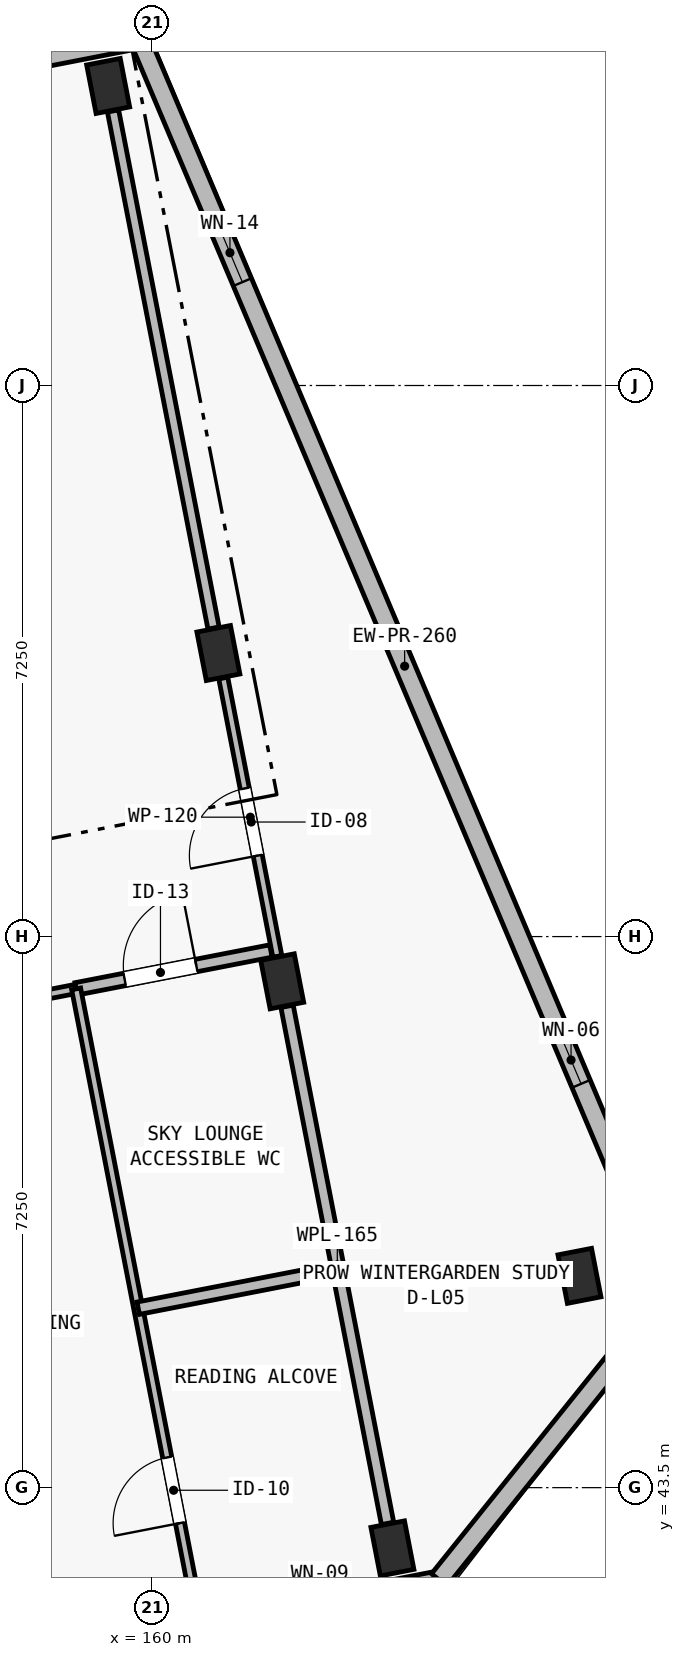
"""IFC4 building model, lengths in metres.
Left out: names, types, materials, properties, quantities, classifications, styles, units other than length and angle.
Written with IfcOpenShell. Run it as: python <this file> out.ifc"""

import sys

from ifc_helpers import new_model, si_unit, direction, frame, frame_2d, origin, origin_2d, place, context, subcontext, project, spatial, rectangle, extrude, element, fill, save


model = new_model("IFC4")
c1 = context("Model", 3, precision=1e-05, world=origin(), true_north=direction((0.0, 1.0)))
c2 = subcontext(c1, "Body", "Model", "MODEL_VIEW")
j1 = project(units=[si_unit("LENGTHUNIT", "METRE"), si_unit("PLANEANGLEUNIT", "RADIAN")], contexts=[c1])
p1 = place(None, origin())
s1 = spatial("IfcSite", under=j1, at=p1, CompositionType="ELEMENT")
p2 = place(p1, origin())
s2 = spatial("IfcBuilding", under=s1, at=p2, CompositionType="ELEMENT")
p3 = place(p2, frame((0.0, 0.0, 18.15)))
s3 = spatial("IfcBuildingStorey", under=s2, at=p3, CompositionType="ELEMENT", Elevation=18.15)
for number, where, z_axis, x_axis in (
    (1, (163.162, 42.701, 0.0), (0.0, 0.0, 1.0), (0.982, 0.191, 0.0)),
    (2, (161.712, 50.161, 0.0), (0.0, 0.0, 1.0), (0.982, 0.191, 0.0)),
    (3, (160.873, 54.48, 0.0), (0.0, 0.0, 1.0), (0.982, 0.191, 0.0)),
    (4, (159.422, 61.941, 0.0), (0.0, 0.0, 1.0), (0.982, 0.191, 0.0)),
    (5, (165.623, 46.286, 0.0), (0.0, 0.0, 1.0), (0.982, 0.191, 0.0)),
):
    element("IfcColumn", number, at=place(p3, frame(where, z_axis=z_axis, x_axis=x_axis)), inside=s3, PredefinedType="COLUMN", context=c2, shape_type="SweptSolid", body=[
        extrude(rectangle(XDim=0.45, YDim=0.65, at=origin_2d()), origin(), (0.0, 0.0, 1.0), 3.25),
    ])
p4 = place(p3, frame((163.778, 42.286, 0.0), z_axis=(0.0, 0.0, 1.0), x_axis=(-0.981628367112, -0.190802905848, 0.0)))
e6 = element("IfcWall", 6, at=p4, inside=s3, PredefinedType="SOLIDWALL", context=c2, shape_type="SweptSolid", body=[
    extrude(rectangle(XDim=8.125, YDim=0.24, at=frame_2d((4.062, 0.0))), origin(), (0.0, 0.0, 1.0), 3.0),
])
p5 = place(p4, frame((1.23, 0.0, 0.48)))
e7 = element("IfcOpeningElement", 7, at=p5, cuts=e6, PredefinedType="OPENING", context=c2, shape_type="SweptSolid", body=[
    extrude(rectangle(XDim=0.74, YDim=2.26, at=frame_2d((0.37, 1.13))), frame((0.0, 0.135, 0.0), z_axis=(0.0, -1.0, 0.0), x_axis=(1.0, 0.0, 0.0)), (0.0, 0.0, 1.0), 0.27),
])
p6 = place(p4, frame((5.035, 0.0, 0.48)))
e8 = element("IfcOpeningElement", 8, at=p6, cuts=e6, PredefinedType="OPENING", context=c2, shape_type="SweptSolid", body=[
    extrude(rectangle(XDim=0.8, YDim=2.3, at=frame_2d((0.4, 1.15))), frame((0.0, 0.135, 0.0), z_axis=(0.0, -1.0, 0.0), x_axis=(1.0, 0.0, 0.0)), (0.0, 0.0, 1.0), 0.27),
])
p7 = place(p3, frame((151.862, 61.006, 0.0), z_axis=(0.0, 0.0, 1.0), x_axis=(0.981627273155, 0.190808533872, 0.0)))
e9 = element("IfcWall", 9, at=p7, inside=s3, PredefinedType="SOLIDWALL", context=c2, shape_type="SweptSolid", body=[
    extrude(rectangle(XDim=8.125, YDim=0.24, at=frame_2d((4.062, 0.0))), origin(), (0.0, 0.0, 1.0), 3.0),
])
p8 = place(p3, frame((159.837, 62.556, 0.0), z_axis=(0.0, 0.0, 1.0), x_axis=(0.389225507936, -0.921142499276, 0.0)))
e10 = element("IfcWall", 10, at=p8, inside=s3, PredefinedType="SOLIDWALL", context=c2, shape_type="SweptSolid", body=[
    extrude(rectangle(XDim=17.91, YDim=0.26, at=frame_2d((8.955, 0.0))), origin(), (0.0, 0.0, 1.0), 3.0),
])
p9 = place(p8, frame((2.63, 0.0, 0.52)))
e11 = element("IfcOpeningElement", 11, at=p9, cuts=e10, PredefinedType="OPENING", context=c2, shape_type="SweptSolid", body=[
    extrude(rectangle(XDim=0.84, YDim=2.28, at=frame_2d((0.42, 1.14))), frame((0.0, 0.145, 0.0), z_axis=(0.0, -1.0, 0.0), x_axis=(1.0, 0.0, 0.0)), (0.0, 0.0, 1.0), 0.29),
])
p10 = place(p8, frame((14.24, 0.0, 0.45)))
e12 = element("IfcOpeningElement", 12, at=p10, cuts=e10, PredefinedType="OPENING", context=c2, shape_type="SweptSolid", body=[
    extrude(rectangle(XDim=0.68, YDim=2.24, at=frame_2d((0.34, 1.12))), frame((0.0, 0.145, 0.0), z_axis=(0.0, -1.0, 0.0), x_axis=(1.0, 0.0, 0.0)), (0.0, 0.0, 1.0), 0.29),
])
p11 = place(p3, frame((166.809, 46.058, 0.0), z_axis=(0.0, 0.0, 1.0), x_axis=(-0.626281072923, -0.779597343312, 0.0)))
e13 = element("IfcWall", 13, at=p11, inside=s3, PredefinedType="SOLIDWALL", context=c2, shape_type="SweptSolid", body=[
    extrude(rectangle(XDim=4.839, YDim=0.26, at=frame_2d((2.42, 0.0))), origin(), (0.0, 0.0, 1.0), 3.0),
])
p12 = place(p3, frame((161.648, 50.49, 0.0), z_axis=(0.0, 0.0, 1.0), x_axis=(-0.190789073686, 0.981631055622, 0.0)))
e14 = element("IfcWall", 14, at=p12, inside=s3, PredefinedType="PARTITIONING", context=c2, shape_type="SweptSolid", body=[
    extrude(rectangle(XDim=3.73, YDim=0.12, at=frame_2d((1.865, 0.0))), origin(), (0.0, 0.0, 1.0), 2.5),
])
p13 = place(p12, frame((1.35, 0.0, 0.0)))
e15 = element("IfcOpeningElement", 15, at=p13, cuts=e14, PredefinedType="OPENING", context=c2, shape_type="SweptSolid", body=[
    extrude(rectangle(XDim=0.9, YDim=2.1, at=frame_2d((0.45, 1.05))), frame((0.0, 0.075, 0.0), z_axis=(0.0, -1.0, 0.0), x_axis=(1.0, 0.0, 0.0)), (0.0, 0.0, 1.0), 0.15),
])
p14 = place(p3, frame((160.809, 54.809, 0.0), z_axis=(0.0, 0.0, 1.0), x_axis=(-0.190808365525, 0.981627305878, 0.0)))
e16 = element("IfcWall", 16, at=p14, inside=s3, PredefinedType="PARTITIONING", context=c2, shape_type="SweptSolid", body=[
    extrude(rectangle(XDim=6.93, YDim=0.15, at=frame_2d((3.465, 0.0))), origin(), (0.0, 0.0, 1.0), 2.5),
])
p15 = place(p3, frame((163.098, 43.03, 0.0), z_axis=(0.0, 0.0, 1.0), x_axis=(-0.190835713385, 0.981621989616, 0.0)))
e17 = element("IfcWall", 17, at=p15, inside=s3, PredefinedType="PLUMBINGWALL", context=c2, shape_type="SweptSolid", body=[
    extrude(rectangle(XDim=6.93, YDim=0.165, at=frame_2d((3.465, 0.0))), origin(), (0.0, 0.0, 1.0), 2.5),
])
p16 = place(p3, frame((154.402, 49.168, 0.0), z_axis=(0.0, 0.0, 1.0), x_axis=(0.981622711665, 0.190831999263, 0.0)))
e18 = element("IfcWall", 18, at=p16, inside=s3, PredefinedType="PARTITIONING", context=c2, shape_type="SweptSolid", body=[
    extrude(rectangle(XDim=4.685, YDim=0.12, at=frame_2d((2.343, 0.0))), origin(), (0.0, 0.0, 1.0), 2.97),
])
p17 = place(p16, frame((1.15, 0.0, 0.0)))
e19 = element("IfcOpeningElement", 19, at=p17, cuts=e18, PredefinedType="OPENING", context=c2, shape_type="SweptSolid", body=[
    extrude(rectangle(XDim=1.15, YDim=2.15, at=frame_2d((0.575, 1.075))), frame((0.0, 0.075, 0.0), z_axis=(0.0, -1.0, 0.0), x_axis=(1.0, 0.0, 0.0)), (0.0, 0.0, 1.0), 0.15),
])
p18 = place(p3, frame((159.001, 50.062, 0.0), z_axis=(0.0, 0.0, 1.0), x_axis=(0.981624151626, 0.190824592083, 0.0)))
e20 = element("IfcWall", 20, at=p18, inside=s3, PredefinedType="PLUMBINGWALL", context=c2, shape_type="SweptSolid", body=[
    extrude(rectangle(XDim=2.61, YDim=0.165, at=frame_2d((1.305, 0.0))), origin(), (0.0, 0.0, 1.0), 2.97),
])
p19 = place(p18, frame((0.65, 0.0, 0.0)))
e21 = element("IfcOpeningElement", 21, at=p19, cuts=e20, PredefinedType="OPENING", context=c2, shape_type="SweptSolid", body=[
    extrude(rectangle(XDim=0.96, YDim=2.12, at=frame_2d((0.48, 1.06))), frame((0.0, 0.097, 0.0), z_axis=(0.0, -1.0, 0.0), x_axis=(1.0, 0.0, 0.0)), (0.0, 0.0, 1.0), 0.195),
])
p20 = place(p3, frame((160.606, 41.807, 0.0), z_axis=(0.0, 0.0, 1.0), x_axis=(-0.190809830256, 0.981627021163, 0.0)))
e22 = element("IfcWall", 22, at=p20, inside=s3, PredefinedType="PARTITIONING", context=c2, shape_type="SweptSolid", body=[
    extrude(rectangle(XDim=8.41, YDim=0.12, at=frame_2d((4.205, 0.0))), origin(), (0.0, 0.0, 1.0), 2.97),
])
p21 = place(p20, frame((1.25, 0.0, 0.0)))
e23 = element("IfcOpeningElement", 23, at=p21, cuts=e22, PredefinedType="OPENING", context=c2, shape_type="SweptSolid", body=[
    extrude(rectangle(XDim=0.88, YDim=2.1, at=frame_2d((0.44, 1.05))), frame((0.0, 0.075, 0.0), z_axis=(0.0, -1.0, 0.0), x_axis=(1.0, 0.0, 0.0)), (0.0, 0.0, 1.0), 0.15),
])
p22 = place(p3, frame((159.818, 45.861, 0.0), z_axis=(0.0, 0.0, 1.0), x_axis=(0.981628634101, 0.19080153226, 0.0)))
e24 = element("IfcWall", 24, at=p22, inside=s3, PredefinedType="PLUMBINGWALL", context=c2, shape_type="SweptSolid", body=[
    extrude(rectangle(XDim=2.59, YDim=0.165, at=frame_2d((1.295, 0.0))), origin(), (0.0, 0.0, 1.0), 2.97),
])
p23 = place(p9, origin())
e25 = element("IfcWindow", 25, at=p23, inside=s3, PartitioningType="SINGLE_PANEL", PredefinedType="WINDOW", context=c2, shape_type="SweptSolid", body=[
    extrude(rectangle(XDim=0.84, YDim=2.28, at=frame_2d((0.42, 1.14))), frame((0.0, 0.03, 0.0), z_axis=(0.0, -1.0, 0.0), x_axis=(1.0, 0.0, 0.0)), (0.0, 0.0, 1.0), 0.06),
])
fill(e11, e25)
p24 = place(p10, origin())
e26 = element("IfcWindow", 26, at=p24, inside=s3, PartitioningType="SINGLE_PANEL", PredefinedType="WINDOW", context=c2, shape_type="SweptSolid", body=[
    extrude(rectangle(XDim=0.68, YDim=2.24, at=frame_2d((0.34, 1.12))), frame((0.0, 0.03, 0.0), z_axis=(0.0, -1.0, 0.0), x_axis=(1.0, 0.0, 0.0)), (0.0, 0.0, 1.0), 0.06),
])
fill(e12, e26)
p25 = place(p13, origin())
e27 = element("IfcDoor", 27, at=p25, inside=s3, OperationType="SINGLE_SWING_LEFT", PredefinedType="DOOR", context=c2, shape_type="SweptSolid", body=[
    extrude(rectangle(XDim=0.9, YDim=2.1, at=frame_2d((0.45, 1.05))), frame((0.0, 0.025, 0.0), z_axis=(0.0, -1.0, 0.0), x_axis=(1.0, 0.0, 0.0)), (0.0, 0.0, 1.0), 0.05),
])
fill(e15, e27)
p26 = place(p19, origin())
e28 = element("IfcDoor", 28, at=p26, inside=s3, OperationType="SINGLE_SWING_RIGHT", PredefinedType="DOOR", context=c2, shape_type="SweptSolid", body=[
    extrude(rectangle(XDim=0.96, YDim=2.12, at=frame_2d((0.48, 1.06))), frame((0.0, 0.025, 0.0), z_axis=(0.0, -1.0, 0.0), x_axis=(1.0, 0.0, 0.0)), (0.0, 0.0, 1.0), 0.05),
])
fill(e21, e28)
p27 = place(p21, origin())
e29 = element("IfcDoor", 29, at=p27, inside=s3, OperationType="SINGLE_SWING_LEFT", PredefinedType="DOOR", context=c2, shape_type="SweptSolid", body=[
    extrude(rectangle(XDim=0.88, YDim=2.1, at=frame_2d((0.44, 1.05))), frame((0.0, 0.025, 0.0), z_axis=(0.0, -1.0, 0.0), x_axis=(1.0, 0.0, 0.0)), (0.0, 0.0, 1.0), 0.05),
])
fill(e23, e29)
save(model, sys.argv[1])
